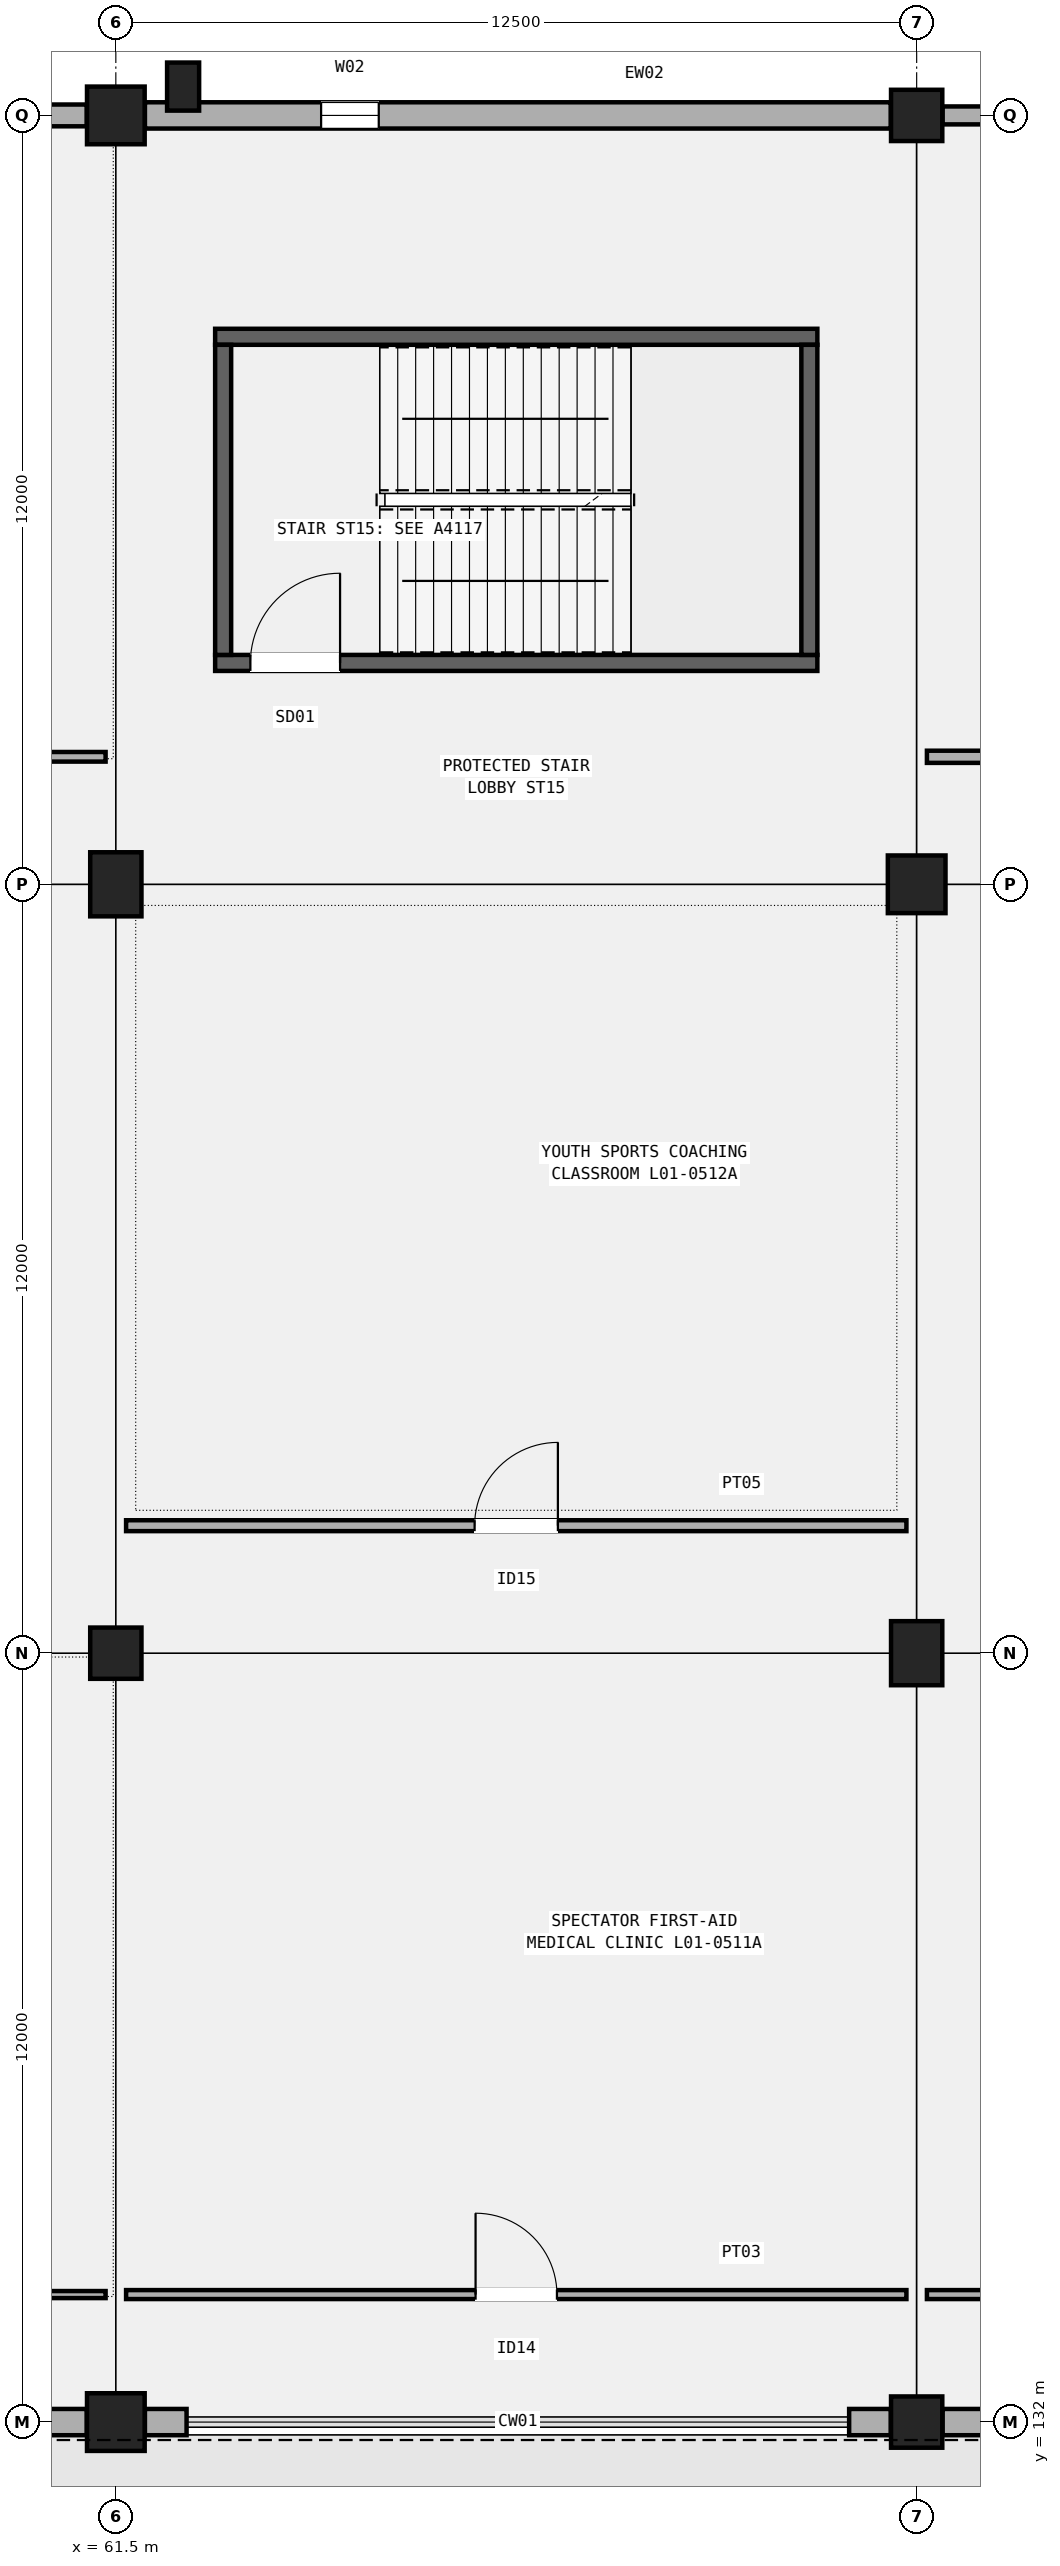
"""IFC4 building model, lengths in metres.
Left out: names, types, materials, properties, quantities, classifications, styles, units other than length and angle.
Written with IfcOpenShell. Run it as: python <this file> out.ifc"""

import sys

from ifc_helpers import new_model, si_unit, direction, frame, frame_2d, origin, origin_2d, place, context, subcontext, project, spatial, rectangle, extrude, element, fill, save


model = new_model("IFC4")
c1 = context("Model", 3, precision=1e-05, world=origin(), true_north=direction((0.0, 1.0)))
c2 = subcontext(c1, "Body", "Model", "MODEL_VIEW")
j1 = project(units=[si_unit("LENGTHUNIT", "METRE"), si_unit("PLANEANGLEUNIT", "RADIAN")], contexts=[c1])
p1 = place(None, origin())
s1 = spatial("IfcSite", under=j1, at=p1, CompositionType="ELEMENT")
p2 = place(p1, origin())
s2 = spatial("IfcBuilding", under=s1, at=p2, CompositionType="ELEMENT")
p3 = place(p2, frame((0.0, 0.0, 5.4)))
s3 = spatial("IfcBuildingStorey", under=s2, at=p3, CompositionType="ELEMENT", Elevation=5.4)
p4 = place(p3, frame((61.5, 132.0, 0.0), z_axis=(0.0, 0.0, 1.0), x_axis=(1.0, 0.0, 0.0)))
e1 = element("IfcColumn", 1, at=p4, inside=s3, PredefinedType="COLUMN", context=c2, shape_type="SweptSolid", body=[
    extrude(rectangle(XDim=0.9, YDim=0.9, at=origin_2d()), origin(), (0.0, 0.0, 1.0), 4.8),
])
p5 = place(p3, frame((61.5, 144.0, 0.0), z_axis=(0.0, 0.0, 1.0), x_axis=(1.0, 0.0, 0.0)))
e2 = element("IfcColumn", 2, at=p5, inside=s3, PredefinedType="COLUMN", context=c2, shape_type="SweptSolid", body=[
    extrude(rectangle(XDim=0.8, YDim=0.8, at=origin_2d()), origin(), (0.0, 0.0, 1.0), 4.8),
])
p6 = place(p3, frame((61.5, 156.0, 0.0), z_axis=(0.0, 0.0, 1.0), x_axis=(1.0, 0.0, 0.0)))
e3 = element("IfcColumn", 3, at=p6, inside=s3, PredefinedType="COLUMN", context=c2, shape_type="SweptSolid", body=[
    extrude(rectangle(XDim=0.8, YDim=1.0, at=origin_2d()), origin(), (0.0, 0.0, 1.0), 4.8),
])
p7 = place(p3, frame((61.5, 168.0, 0.0), z_axis=(0.0, 0.0, 1.0), x_axis=(1.0, 0.0, 0.0)))
e4 = element("IfcColumn", 4, at=p7, inside=s3, PredefinedType="COLUMN", context=c2, shape_type="SweptSolid", body=[
    extrude(rectangle(XDim=0.9, YDim=0.9, at=origin_2d()), origin(), (0.0, 0.0, 1.0), 4.8),
])
p8 = place(p3, frame((74.0, 132.0, 0.0), z_axis=(0.0, 0.0, 1.0), x_axis=(1.0, 0.0, 0.0)))
e5 = element("IfcColumn", 5, at=p8, inside=s3, PredefinedType="COLUMN", context=c2, shape_type="SweptSolid", body=[
    extrude(rectangle(XDim=0.8, YDim=0.8, at=origin_2d()), origin(), (0.0, 0.0, 1.0), 4.8),
])
p9 = place(p3, frame((74.0, 144.0, 0.0), z_axis=(0.0, 0.0, 1.0), x_axis=(1.0, 0.0, 0.0)))
e6 = element("IfcColumn", 6, at=p9, inside=s3, PredefinedType="COLUMN", context=c2, shape_type="SweptSolid", body=[
    extrude(rectangle(XDim=0.8, YDim=1.0, at=origin_2d()), origin(), (0.0, 0.0, 1.0), 4.8),
])
p10 = place(p3, frame((74.0, 156.0, 0.0), z_axis=(0.0, 0.0, 1.0), x_axis=(1.0, 0.0, 0.0)))
e7 = element("IfcColumn", 7, at=p10, inside=s3, PredefinedType="COLUMN", context=c2, shape_type="SweptSolid", body=[
    extrude(rectangle(XDim=0.9, YDim=0.9, at=origin_2d()), origin(), (0.0, 0.0, 1.0), 4.8),
])
p11 = place(p3, frame((74.0, 168.0, 0.0), z_axis=(0.0, 0.0, 1.0), x_axis=(1.0, 0.0, 0.0)))
e8 = element("IfcColumn", 8, at=p11, inside=s3, PredefinedType="COLUMN", context=c2, shape_type="SweptSolid", body=[
    extrude(rectangle(XDim=0.8, YDim=0.8, at=origin_2d()), origin(), (0.0, 0.0, 1.0), 4.8),
])
p12 = place(p3, frame((62.55, 168.45, 0.0), z_axis=(0.0, 0.0, 1.0), x_axis=(1.0, 0.0, 0.0)))
e9 = element("IfcColumn", 9, at=p12, inside=s3, PredefinedType="PILASTER", context=c2, shape_type="SweptSolid", body=[
    extrude(rectangle(XDim=0.5, YDim=0.75, at=origin_2d()), origin(), (0.0, 0.0, 1.0), 4.8),
])
p13 = place(p3, frame((60.396, 132.0, 0.0), z_axis=(0.0, 0.0, 1.0), x_axis=(1.0, 0.0, 0.0)))
e10 = element("IfcWall", 10, at=p13, inside=s3, PredefinedType="SOLIDWALL", context=c2, shape_type="SweptSolid", body=[
    extrude(rectangle(XDim=0.65, YDim=0.41, at=frame_2d((0.325, 0.0))), origin(), (0.0, 0.0, 1.0), 4.2),
])
p14 = place(p3, frame((49.404, 168.0, 0.0), z_axis=(0.0, 0.0, 1.0), x_axis=(1.0, 0.0, 0.0)))
e11 = element("IfcWall", 11, at=p14, inside=s3, PredefinedType="SOLIDWALL", context=c2, shape_type="SweptSolid", body=[
    extrude(rectangle(XDim=11.642, YDim=0.34, at=frame_2d((5.821, 0.0))), origin(), (0.0, 0.0, 1.0), 4.15),
])
p15 = place(p14, frame((1.5, 0.0, 0.95)))
e12 = element("IfcOpeningElement", 12, at=p15, cuts=e11, PredefinedType="OPENING", context=c2, shape_type="SweptSolid", body=[
    extrude(rectangle(XDim=3.6, YDim=2.15, at=frame_2d((1.8, 1.075))), frame((0.0, 0.18, 0.0), z_axis=(0.0, -1.0, 0.0), x_axis=(1.0, 0.0, 0.0)), (0.0, 0.0, 1.0), 0.36),
])
for number, where, z_axis, x_axis in (
    (13, (61.954, 132.0, 0.0), (0.0, 0.0, 1.0), (1.0, 0.0, 0.0)),
    (14, (72.946, 132.0, 0.0), (0.0, 0.0, 1.0), (1.0, 0.0, 0.0)),
):
    element("IfcWall", number, at=place(p3, frame(where, z_axis=z_axis, x_axis=x_axis)), inside=s3, PredefinedType="SOLIDWALL", context=c2, shape_type="SweptSolid", body=[
        extrude(rectangle(XDim=0.65, YDim=0.41, at=frame_2d((0.325, 0.0))), origin(), (0.0, 0.0, 1.0), 4.15),
    ])
p16 = place(p3, frame((61.954, 168.0, 0.0), z_axis=(0.0, 0.0, 1.0), x_axis=(1.0, 0.0, 0.0)))
e15 = element("IfcWall", 15, at=p16, inside=s3, PredefinedType="SOLIDWALL", context=c2, shape_type="SweptSolid", body=[
    extrude(rectangle(XDim=11.642, YDim=0.41, at=frame_2d((5.821, 0.0))), origin(), (0.0, 0.0, 1.0), 4.2),
])
p17 = place(p16, frame((2.75, 0.0, 0.95)))
e16 = element("IfcOpeningElement", 16, at=p17, cuts=e15, PredefinedType="OPENING", context=c2, shape_type="SweptSolid", body=[
    extrude(rectangle(XDim=0.9, YDim=2.4, at=frame_2d((0.45, 1.2))), frame((0.0, 0.215, 0.0), z_axis=(0.0, -1.0, 0.0), x_axis=(1.0, 0.0, 0.0)), (0.0, 0.0, 1.0), 0.43),
])
p18 = place(p3, frame((74.404, 132.0, 0.0), z_axis=(0.0, 0.0, 1.0), x_axis=(1.0, 0.0, 0.0)))
e17 = element("IfcWall", 17, at=p18, inside=s3, PredefinedType="SOLIDWALL", context=c2, shape_type="SweptSolid", body=[
    extrude(rectangle(XDim=0.65, YDim=0.41, at=frame_2d((0.325, 0.0))), origin(), (0.0, 0.0, 1.0), 4.2),
])
p19 = place(p3, frame((74.404, 168.0, 0.0), z_axis=(0.0, 0.0, 1.0), x_axis=(1.0, 0.0, 0.0)))
e18 = element("IfcWall", 18, at=p19, inside=s3, PredefinedType="SOLIDWALL", context=c2, shape_type="SweptSolid", body=[
    extrude(rectangle(XDim=11.692, YDim=0.28, at=frame_2d((5.846, 0.0))), origin(), (0.0, 0.0, 1.0), 4.15),
])
p20 = place(p19, frame((1.5, 0.0, 0.95)))
e19 = element("IfcOpeningElement", 19, at=p20, cuts=e18, PredefinedType="OPENING", context=c2, shape_type="SweptSolid", body=[
    extrude(rectangle(XDim=1.05, YDim=2.2, at=frame_2d((0.525, 1.1))), frame((0.0, 0.15, 0.0), z_axis=(0.0, -1.0, 0.0), x_axis=(1.0, 0.0, 0.0)), (0.0, 0.0, 1.0), 0.3),
])
p21 = place(p3, frame((63.05, 159.455, 0.0), z_axis=(0.0, 0.0, 1.0), x_axis=(1.0, 0.0, 0.0)))
e20 = element("IfcWall", 20, at=p21, inside=s3, PredefinedType="SHEAR", context=c2, shape_type="SweptSolid", body=[
    extrude(rectangle(XDim=9.4, YDim=0.25, at=frame_2d((4.7, 0.0))), origin(), (0.0, 0.0, 1.0), 4.55),
])
p22 = place(p21, frame((0.55, 0.0, 0.0)))
e21 = element("IfcOpeningElement", 21, at=p22, cuts=e20, PredefinedType="OPENING", context=c2, shape_type="SweptSolid", body=[
    extrude(rectangle(XDim=1.4, YDim=2.15, at=frame_2d((0.7, 1.075))), frame((0.0, 0.135, 0.0), z_axis=(0.0, -1.0, 0.0), x_axis=(1.0, 0.0, 0.0)), (0.0, 0.0, 1.0), 0.27),
])
p23 = place(p3, frame((63.05, 164.545, 0.0), z_axis=(0.0, 0.0, 1.0), x_axis=(1.0, 0.0, 0.0)))
e22 = element("IfcWall", 22, at=p23, inside=s3, PredefinedType="SHEAR", context=c2, shape_type="SweptSolid", body=[
    extrude(rectangle(XDim=9.4, YDim=0.25, at=frame_2d((4.7, 0.0))), origin(), (0.0, 0.0, 1.0), 4.55),
])
for number, where, z_axis, x_axis in (
    (23, (63.175, 159.58, 0.0), (0.0, 0.0, 1.0), (0.0, 1.0, 0.0)),
    (24, (72.325, 159.58, 0.0), (0.0, 0.0, 1.0), (0.0, 1.0, 0.0)),
):
    element("IfcWall", number, at=place(p3, frame(where, z_axis=z_axis, x_axis=x_axis)), inside=s3, PredefinedType="SHEAR", context=c2, shape_type="SweptSolid", body=[
        extrude(rectangle(XDim=4.84, YDim=0.25, at=frame_2d((2.42, 0.0))), origin(), (0.0, 0.0, 1.0), 4.55),
    ])
p24 = place(p3, frame((50.92, 133.99, 0.0), z_axis=(0.0, 0.0, 1.0), x_axis=(1.0, 0.0, 0.0)))
e25 = element("IfcWall", 25, at=p24, inside=s3, PredefinedType="PARTITIONING", context=c2, shape_type="SweptSolid", body=[
    extrude(rectangle(XDim=10.42, YDim=0.11, at=frame_2d((5.21, 0.0))), origin(), (0.0, 0.0, 1.0), 3.92),
])
p25 = place(p24, frame((4.635, 0.0, 0.0)))
e26 = element("IfcOpeningElement", 26, at=p25, cuts=e25, PredefinedType="OPENING", context=c2, shape_type="SweptSolid", body=[
    extrude(rectangle(XDim=1.15, YDim=2.15, at=frame_2d((0.575, 1.075))), frame((0.0, 0.065, 0.0), z_axis=(0.0, -1.0, 0.0), x_axis=(1.0, 0.0, 0.0)), (0.0, 0.0, 1.0), 0.13),
])
p26 = place(p3, frame((50.92, 157.99, 0.0), z_axis=(0.0, 0.0, 1.0), x_axis=(1.0, 0.0, 0.0)))
e27 = element("IfcWall", 27, at=p26, inside=s3, PredefinedType="PARTITIONING", context=c2, shape_type="SweptSolid", body=[
    extrude(rectangle(XDim=10.42, YDim=0.15, at=frame_2d((5.21, 0.0))), origin(), (0.0, 0.0, 1.0), 3.92),
])
p27 = place(p26, frame((4.62, 0.0, 0.0)))
e28 = element("IfcOpeningElement", 28, at=p27, cuts=e27, PredefinedType="OPENING", context=c2, shape_type="SweptSolid", body=[
    extrude(rectangle(XDim=1.18, YDim=2.2, at=frame_2d((0.59, 1.1))), frame((0.0, 0.085, 0.0), z_axis=(0.0, -1.0, 0.0), x_axis=(1.0, 0.0, 0.0)), (0.0, 0.0, 1.0), 0.17),
])
p28 = place(p3, frame((61.66, 133.99, 0.0), z_axis=(0.0, 0.0, 1.0), x_axis=(1.0, 0.0, 0.0)))
e29 = element("IfcWall", 29, at=p28, inside=s3, PredefinedType="PARTITIONING", context=c2, shape_type="SweptSolid", body=[
    extrude(rectangle(XDim=12.18, YDim=0.14, at=frame_2d((6.09, 0.0))), origin(), (0.0, 0.0, 1.0), 3.92),
])
p29 = place(p28, frame((5.455, 0.0, 0.0)))
e30 = element("IfcOpeningElement", 30, at=p29, cuts=e29, PredefinedType="OPENING", context=c2, shape_type="SweptSolid", body=[
    extrude(rectangle(XDim=1.27, YDim=2.2, at=frame_2d((0.635, 1.1))), frame((0.0, 0.08, 0.0), z_axis=(0.0, -1.0, 0.0), x_axis=(1.0, 0.0, 0.0)), (0.0, 0.0, 1.0), 0.16),
])
p30 = place(p3, frame((61.66, 145.99, 0.0), z_axis=(0.0, 0.0, 1.0), x_axis=(1.0, 0.0, 0.0)))
e31 = element("IfcWall", 31, at=p30, inside=s3, PredefinedType="PARTITIONING", context=c2, shape_type="SweptSolid", body=[
    extrude(rectangle(XDim=12.18, YDim=0.17, at=frame_2d((6.09, 0.0))), origin(), (0.0, 0.0, 1.0), 3.92),
])
p31 = place(p30, frame((5.44, 0.0, 0.0)))
e32 = element("IfcOpeningElement", 32, at=p31, cuts=e31, PredefinedType="OPENING", context=c2, shape_type="SweptSolid", body=[
    extrude(rectangle(XDim=1.3, YDim=2.24, at=frame_2d((0.65, 1.12))), frame((0.0, 0.095, 0.0), z_axis=(0.0, -1.0, 0.0), x_axis=(1.0, 0.0, 0.0)), (0.0, 0.0, 1.0), 0.19),
])
p32 = place(p3, frame((74.16, 133.99, 0.0), z_axis=(0.0, 0.0, 1.0), x_axis=(1.0, 0.0, 0.0)))
e33 = element("IfcWall", 33, at=p32, inside=s3, PredefinedType="PARTITIONING", context=c2, shape_type="SweptSolid", body=[
    extrude(rectangle(XDim=12.18, YDim=0.14, at=frame_2d((6.09, 0.0))), origin(), (0.0, 0.0, 1.0), 3.92),
])
p33 = place(p32, frame((2.386, 0.0, 0.0)))
e34 = element("IfcOpeningElement", 34, at=p33, cuts=e33, PredefinedType="OPENING", context=c2, shape_type="SweptSolid", body=[
    extrude(rectangle(XDim=1.36, YDim=2.25, at=frame_2d((0.68, 1.125))), frame((0.0, 0.08, 0.0), z_axis=(0.0, -1.0, 0.0), x_axis=(1.0, 0.0, 0.0)), (0.0, 0.0, 1.0), 0.16),
])
p34 = place(p32, frame((8.536, 0.0, 0.0)))
e35 = element("IfcOpeningElement", 35, at=p34, cuts=e33, PredefinedType="OPENING", context=c2, shape_type="SweptSolid", body=[
    extrude(rectangle(XDim=1.4, YDim=2.24, at=frame_2d((0.7, 1.12))), frame((0.0, 0.08, 0.0), z_axis=(0.0, -1.0, 0.0), x_axis=(1.0, 0.0, 0.0)), (0.0, 0.0, 1.0), 0.16),
])
p35 = place(p3, frame((74.16, 157.99, 0.0), z_axis=(0.0, 0.0, 1.0), x_axis=(1.0, 0.0, 0.0)))
e36 = element("IfcWall", 36, at=p35, inside=s3, PredefinedType="PARTITIONING", context=c2, shape_type="SweptSolid", body=[
    extrude(rectangle(XDim=12.18, YDim=0.19, at=frame_2d((6.09, 0.0))), origin(), (0.0, 0.0, 1.0), 3.92),
])
p36 = place(p35, frame((5.37, 0.0, 0.0)))
e37 = element("IfcOpeningElement", 37, at=p36, cuts=e36, PredefinedType="OPENING", context=c2, shape_type="SweptSolid", body=[
    extrude(rectangle(XDim=1.44, YDim=2.26, at=frame_2d((0.72, 1.13))), frame((0.0, 0.105, 0.0), z_axis=(0.0, -1.0, 0.0), x_axis=(1.0, 0.0, 0.0)), (0.0, 0.0, 1.0), 0.21),
])
p37 = place(p17, origin())
e38 = element("IfcWindow", 38, at=p37, inside=s3, PartitioningType="SINGLE_PANEL", PredefinedType="WINDOW", context=c2, shape_type="SweptSolid", body=[
    extrude(rectangle(XDim=0.9, YDim=2.4, at=frame_2d((0.45, 1.2))), frame((0.0, 0.03, 0.0), z_axis=(0.0, -1.0, 0.0), x_axis=(1.0, 0.0, 0.0)), (0.0, 0.0, 1.0), 0.06),
])
fill(e16, e38)
p38 = place(p22, origin())
e39 = element("IfcDoor", 39, at=p38, inside=s3, OperationType="SINGLE_SWING_RIGHT", PredefinedType="DOOR", context=c2, shape_type="SweptSolid", body=[
    extrude(rectangle(XDim=1.4, YDim=2.15, at=frame_2d((0.7, 1.075))), frame((0.0, 0.025, 0.0), z_axis=(0.0, -1.0, 0.0), x_axis=(1.0, 0.0, 0.0)), (0.0, 0.0, 1.0), 0.05),
])
fill(e21, e39)
p39 = place(p29, origin())
e40 = element("IfcDoor", 40, at=p39, inside=s3, OperationType="SINGLE_SWING_LEFT", PredefinedType="DOOR", context=c2, shape_type="SweptSolid", body=[
    extrude(rectangle(XDim=1.27, YDim=2.2, at=frame_2d((0.635, 1.1))), frame((0.0, 0.025, 0.0), z_axis=(0.0, -1.0, 0.0), x_axis=(1.0, 0.0, 0.0)), (0.0, 0.0, 1.0), 0.05),
])
fill(e30, e40)
p40 = place(p31, origin())
e41 = element("IfcDoor", 41, at=p40, inside=s3, OperationType="SINGLE_SWING_RIGHT", PredefinedType="DOOR", context=c2, shape_type="SweptSolid", body=[
    extrude(rectangle(XDim=1.3, YDim=2.24, at=frame_2d((0.65, 1.12))), frame((0.0, 0.025, 0.0), z_axis=(0.0, -1.0, 0.0), x_axis=(1.0, 0.0, 0.0)), (0.0, 0.0, 1.0), 0.05),
])
fill(e32, e41)
save(model, sys.argv[1])
